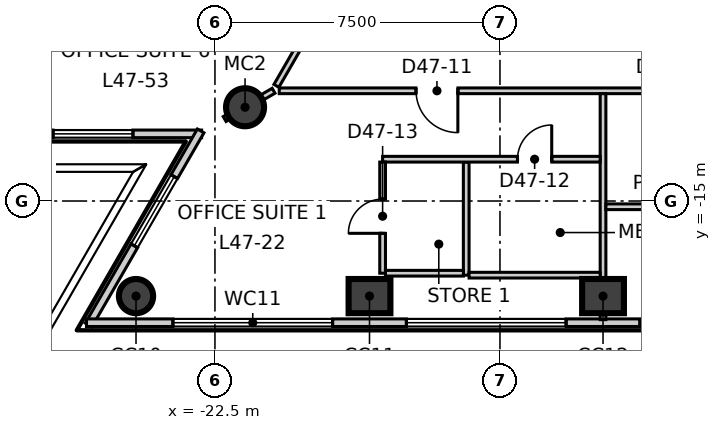
"""IFC4 building model, lengths in metres.
Left out: names, types, materials, properties, quantities, classifications, styles, units other than length and angle.
Written with IfcOpenShell. Run it as: python <this file> out.ifc"""

import sys

from ifc_helpers import new_model, si_unit, direction, frame, frame_2d, origin, origin_2d, place, context, subcontext, project, spatial, rectangle, circle, extrude, element, fill, save


model = new_model("IFC4")
c1 = context("Model", 3, precision=1e-05, world=origin(), true_north=direction((0.0, 1.0)))
c2 = subcontext(c1, "Body", "Model", "MODEL_VIEW")
j1 = project(units=[si_unit("LENGTHUNIT", "METRE"), si_unit("PLANEANGLEUNIT", "RADIAN")], contexts=[c1])
p1 = place(None, origin())
s1 = spatial("IfcSite", under=j1, at=p1, CompositionType="ELEMENT")
p2 = place(p1, origin())
s2 = spatial("IfcBuilding", under=s1, at=p2, CompositionType="ELEMENT")
p3 = place(p2, frame((0.0, 0.0, 203.3)))
s3 = spatial("IfcBuildingStorey", under=s2, at=p3, CompositionType="ELEMENT", Elevation=203.3)
p4 = place(p3, frame((-24.577, -17.502, -0.3), z_axis=(0.0, 0.0, 1.0), x_axis=(1.0, 0.0, 0.0)))
e1 = element("IfcColumn", 1, at=p4, inside=s3, PredefinedType="COLUMN", context=c2, shape_type="SweptSolid", body=[
    extrude(circle(Radius=0.45, at=origin_2d()), origin(), (0.0, 0.0, 1.0), 4.0),
])
for number, where, z_axis, x_axis in (
    (2, (-18.433, -17.502, -0.3), (0.0, 0.0, 1.0), (1.0, 0.0, 0.0)),
    (3, (-12.288, -17.502, -0.3), (0.0, 0.0, 1.0), (1.0, 0.0, 0.0)),
):
    element("IfcColumn", number, at=place(p3, frame(where, z_axis=z_axis, x_axis=x_axis)), inside=s3, PredefinedType="COLUMN", context=c2, shape_type="SweptSolid", body=[
        extrude(rectangle(XDim=1.1, YDim=0.9, at=origin_2d()), origin(), (0.0, 0.0, 1.0), 4.0),
    ])
p5 = place(p3, frame((-21.708, -12.533, -0.3), z_axis=(0.0, 0.0, 1.0), x_axis=(1.0, 0.0, 0.0)))
e4 = element("IfcColumn", 4, at=p5, inside=s3, PredefinedType="COLUMN", context=c2, shape_type="SweptSolid", body=[
    extrude(circle(Radius=0.5, at=origin_2d()), origin(), (0.0, 0.0, 1.0), 4.0),
])
p6 = place(p3, frame((-2.824, 31.513, 0.0), z_axis=(0.0, 0.0, 1.0), x_axis=(-0.500012324412, -0.866018288165, 0.0)))
e5 = element("IfcWall", 5, at=p6, inside=s3, PredefinedType="ELEMENTEDWALL", context=c2, shape_type="SweptSolid", body=[
    extrude(rectangle(XDim=51.739, YDim=0.2, at=frame_2d((25.87, 0.0))), origin(), (0.0, 0.0, 1.0), 3.7),
])
p7 = place(p6, frame((2.275, 0.0, 0.9)))
e6 = element("IfcOpeningElement", 6, at=p7, cuts=e5, PredefinedType="OPENING", context=c2, shape_type="SweptSolid", body=[
    extrude(rectangle(XDim=4.2, YDim=2.5, at=frame_2d((2.1, 1.25))), frame((0.0, 0.11, 0.0), z_axis=(0.0, -1.0, 0.0), x_axis=(1.0, 0.0, 0.0)), (0.0, 0.0, 1.0), 0.22),
])
p8 = place(p6, frame((8.419, 0.0, 0.9)))
e7 = element("IfcOpeningElement", 7, at=p8, cuts=e5, PredefinedType="OPENING", context=c2, shape_type="SweptSolid", body=[
    extrude(rectangle(XDim=4.2, YDim=2.5, at=frame_2d((2.1, 1.25))), frame((0.0, 0.11, 0.0), z_axis=(0.0, -1.0, 0.0), x_axis=(1.0, 0.0, 0.0)), (0.0, 0.0, 1.0), 0.22),
])
p9 = place(p6, frame((14.563, 0.0, 0.9)))
e8 = element("IfcOpeningElement", 8, at=p9, cuts=e5, PredefinedType="OPENING", context=c2, shape_type="SweptSolid", body=[
    extrude(rectangle(XDim=4.2, YDim=2.5, at=frame_2d((2.1, 1.25))), frame((0.0, 0.11, 0.0), z_axis=(0.0, -1.0, 0.0), x_axis=(1.0, 0.0, 0.0)), (0.0, 0.0, 1.0), 0.22),
])
p10 = place(p6, frame((20.707, 0.0, 0.9)))
e9 = element("IfcOpeningElement", 9, at=p10, cuts=e5, PredefinedType="OPENING", context=c2, shape_type="SweptSolid", body=[
    extrude(rectangle(XDim=4.2, YDim=2.5, at=frame_2d((2.1, 1.25))), frame((0.0, 0.11, 0.0), z_axis=(0.0, -1.0, 0.0), x_axis=(1.0, 0.0, 0.0)), (0.0, 0.0, 1.0), 0.22),
])
p11 = place(p6, frame((26.851, 0.0, 0.9)))
e10 = element("IfcOpeningElement", 10, at=p11, cuts=e5, PredefinedType="OPENING", context=c2, shape_type="SweptSolid", body=[
    extrude(rectangle(XDim=4.2, YDim=2.5, at=frame_2d((2.1, 1.25))), frame((0.0, 0.11, 0.0), z_axis=(0.0, -1.0, 0.0), x_axis=(1.0, 0.0, 0.0)), (0.0, 0.0, 1.0), 0.22),
])
p12 = place(p6, frame((32.995, 0.0, 0.9)))
e11 = element("IfcOpeningElement", 11, at=p12, cuts=e5, PredefinedType="OPENING", context=c2, shape_type="SweptSolid", body=[
    extrude(rectangle(XDim=4.2, YDim=2.5, at=frame_2d((2.1, 1.25))), frame((0.0, 0.11, 0.0), z_axis=(0.0, -1.0, 0.0), x_axis=(1.0, 0.0, 0.0)), (0.0, 0.0, 1.0), 0.22),
])
p13 = place(p6, frame((39.14, 0.0, 0.9)))
e12 = element("IfcOpeningElement", 12, at=p13, cuts=e5, PredefinedType="OPENING", context=c2, shape_type="SweptSolid", body=[
    extrude(rectangle(XDim=4.2, YDim=2.5, at=frame_2d((2.1, 1.25))), frame((0.0, 0.11, 0.0), z_axis=(0.0, -1.0, 0.0), x_axis=(1.0, 0.0, 0.0)), (0.0, 0.0, 1.0), 0.22),
])
p14 = place(p6, frame((45.284, 0.0, 0.9)))
e13 = element("IfcOpeningElement", 13, at=p14, cuts=e5, PredefinedType="OPENING", context=c2, shape_type="SweptSolid", body=[
    extrude(rectangle(XDim=4.2, YDim=2.5, at=frame_2d((2.1, 1.25))), frame((0.0, 0.11, 0.0), z_axis=(0.0, -1.0, 0.0), x_axis=(1.0, 0.0, 0.0)), (0.0, 0.0, 1.0), 0.22),
])
p15 = place(p3, frame((-28.749, -13.233, 0.0), z_axis=(0.0, 0.0, 1.0), x_axis=(1.0, 0.0, 0.0)))
e14 = element("IfcWall", 14, at=p15, inside=s3, PredefinedType="ELEMENTEDWALL", context=c2, shape_type="SweptSolid", body=[
    extrude(rectangle(XDim=5.898, YDim=0.2, at=frame_2d((2.949, 0.0))), origin(), (0.0, 0.0, 1.0), 3.7),
])
p16 = place(p15, frame((1.99, 0.0, 0.9)))
e15 = element("IfcOpeningElement", 15, at=p16, cuts=e14, PredefinedType="OPENING", context=c2, shape_type="SweptSolid", body=[
    extrude(rectangle(XDim=2.1, YDim=2.5, at=frame_2d((1.05, 1.25))), frame((0.0, 0.11, 0.0), z_axis=(0.0, -1.0, 0.0), x_axis=(1.0, 0.0, 0.0)), (0.0, 0.0, 1.0), 0.22),
])
p17 = place(p3, frame((-22.876, -13.155, 0.0), z_axis=(0.0, 0.0, 1.0), x_axis=(-0.499989993172, -0.866031181152, 0.0)))
e16 = element("IfcWall", 16, at=p17, inside=s3, PredefinedType="ELEMENTEDWALL", context=c2, shape_type="SweptSolid", body=[
    extrude(rectangle(XDim=5.898, YDim=0.2, at=frame_2d((2.949, 0.0))), origin(), (0.0, 0.0, 1.0), 3.7),
])
p18 = place(p17, frame((1.39, 0.0, 0.9)))
e17 = element("IfcOpeningElement", 17, at=p18, cuts=e16, PredefinedType="OPENING", context=c2, shape_type="SweptSolid", body=[
    extrude(rectangle(XDim=2.1, YDim=2.5, at=frame_2d((1.05, 1.25))), frame((0.0, 0.11, 0.0), z_axis=(0.0, -1.0, 0.0), x_axis=(1.0, 0.0, 0.0)), (0.0, 0.0, 1.0), 0.22),
])
p19 = place(p3, frame((-25.88, -18.202, 0.0), z_axis=(0.0, 0.0, 1.0), x_axis=(1.0, 0.0, 0.0)))
e18 = element("IfcWall", 18, at=p19, inside=s3, PredefinedType="ELEMENTEDWALL", context=c2, shape_type="SweptSolid", body=[
    extrude(rectangle(XDim=51.74, YDim=0.2, at=frame_2d((25.87, 0.0))), origin(), (0.0, 0.0, 1.0), 3.7),
])
p20 = place(p19, frame((2.275, 0.0, 0.9)))
e19 = element("IfcOpeningElement", 19, at=p20, cuts=e18, PredefinedType="OPENING", context=c2, shape_type="SweptSolid", body=[
    extrude(rectangle(XDim=4.2, YDim=2.5, at=frame_2d((2.1, 1.25))), frame((0.0, 0.11, 0.0), z_axis=(0.0, -1.0, 0.0), x_axis=(1.0, 0.0, 0.0)), (0.0, 0.0, 1.0), 0.22),
])
p21 = place(p19, frame((8.419, 0.0, 0.9)))
e20 = element("IfcOpeningElement", 20, at=p21, cuts=e18, PredefinedType="OPENING", context=c2, shape_type="SweptSolid", body=[
    extrude(rectangle(XDim=4.2, YDim=2.5, at=frame_2d((2.1, 1.25))), frame((0.0, 0.11, 0.0), z_axis=(0.0, -1.0, 0.0), x_axis=(1.0, 0.0, 0.0)), (0.0, 0.0, 1.0), 0.22),
])
p22 = place(p19, frame((14.564, 0.0, 0.9)))
e21 = element("IfcOpeningElement", 21, at=p22, cuts=e18, PredefinedType="OPENING", context=c2, shape_type="SweptSolid", body=[
    extrude(rectangle(XDim=4.2, YDim=2.5, at=frame_2d((2.1, 1.25))), frame((0.0, 0.11, 0.0), z_axis=(0.0, -1.0, 0.0), x_axis=(1.0, 0.0, 0.0)), (0.0, 0.0, 1.0), 0.22),
])
p23 = place(p19, frame((20.708, 0.0, 0.9)))
e22 = element("IfcOpeningElement", 22, at=p23, cuts=e18, PredefinedType="OPENING", context=c2, shape_type="SweptSolid", body=[
    extrude(rectangle(XDim=4.2, YDim=2.5, at=frame_2d((2.1, 1.25))), frame((0.0, 0.11, 0.0), z_axis=(0.0, -1.0, 0.0), x_axis=(1.0, 0.0, 0.0)), (0.0, 0.0, 1.0), 0.22),
])
p24 = place(p19, frame((26.852, 0.0, 0.9)))
e23 = element("IfcOpeningElement", 23, at=p24, cuts=e18, PredefinedType="OPENING", context=c2, shape_type="SweptSolid", body=[
    extrude(rectangle(XDim=4.2, YDim=2.5, at=frame_2d((2.1, 1.25))), frame((0.0, 0.11, 0.0), z_axis=(0.0, -1.0, 0.0), x_axis=(1.0, 0.0, 0.0)), (0.0, 0.0, 1.0), 0.22),
])
p25 = place(p19, frame((32.996, 0.0, 0.9)))
e24 = element("IfcOpeningElement", 24, at=p25, cuts=e18, PredefinedType="OPENING", context=c2, shape_type="SweptSolid", body=[
    extrude(rectangle(XDim=4.2, YDim=2.5, at=frame_2d((2.1, 1.25))), frame((0.0, 0.11, 0.0), z_axis=(0.0, -1.0, 0.0), x_axis=(1.0, 0.0, 0.0)), (0.0, 0.0, 1.0), 0.22),
])
p26 = place(p19, frame((39.141, 0.0, 0.9)))
e25 = element("IfcOpeningElement", 25, at=p26, cuts=e18, PredefinedType="OPENING", context=c2, shape_type="SweptSolid", body=[
    extrude(rectangle(XDim=4.2, YDim=2.5, at=frame_2d((2.1, 1.25))), frame((0.0, 0.11, 0.0), z_axis=(0.0, -1.0, 0.0), x_axis=(1.0, 0.0, 0.0)), (0.0, 0.0, 1.0), 0.22),
])
p27 = place(p19, frame((45.285, 0.0, 0.9)))
e26 = element("IfcOpeningElement", 26, at=p27, cuts=e18, PredefinedType="OPENING", context=c2, shape_type="SweptSolid", body=[
    extrude(rectangle(XDim=4.2, YDim=2.5, at=frame_2d((2.1, 1.25))), frame((0.0, 0.11, 0.0), z_axis=(0.0, -1.0, 0.0), x_axis=(1.0, 0.0, 0.0)), (0.0, 0.0, 1.0), 0.22),
])
p28 = place(p3, frame((-22.245, -12.843, 0.0), z_axis=(0.0, 0.0, 1.0), x_axis=(0.865961433946, 0.500110782645, 0.0)))
e27 = element("IfcWall", 27, at=p28, inside=s3, PredefinedType="PARTITIONING", context=c2, shape_type="SweptSolid", body=[
    extrude(rectangle(XDim=1.488, YDim=0.15, at=frame_2d((0.744, 0.0))), origin(), (0.0, 0.0, 1.0), 3.2),
])
p29 = place(p3, frame((-20.883, -11.97, 0.0), z_axis=(0.0, 0.0, 1.0), x_axis=(0.500006150555, 0.866021852731, 0.0)))
e28 = element("IfcWall", 28, at=p29, inside=s3, PredefinedType="PARTITIONING", context=c2, shape_type="SweptSolid", body=[
    extrude(rectangle(XDim=41.766, YDim=0.15, at=frame_2d((20.883, 0.0))), origin(), (0.0, 0.0, 1.0), 3.7),
])
p30 = place(p29, frame((36.916, 0.0, 0.0)))
e29 = element("IfcOpeningElement", 29, at=p30, cuts=e28, PredefinedType="OPENING", context=c2, shape_type="SweptSolid", body=[
    extrude(rectangle(XDim=1.1, YDim=2.1, at=frame_2d((0.55, 1.05))), frame((0.0, 0.085, 0.0), z_axis=(0.0, -1.0, 0.0), x_axis=(1.0, 0.0, 0.0)), (0.0, 0.0, 1.0), 0.17),
])
p31 = place(p29, frame((26.446, 0.0, 0.0)))
e30 = element("IfcOpeningElement", 30, at=p31, cuts=e28, PredefinedType="OPENING", context=c2, shape_type="SweptSolid", body=[
    extrude(rectangle(XDim=1.1, YDim=2.1, at=frame_2d((0.55, 1.05))), frame((0.0, 0.085, 0.0), z_axis=(0.0, -1.0, 0.0), x_axis=(1.0, 0.0, 0.0)), (0.0, 0.0, 1.0), 0.17),
])
p32 = place(p29, frame((9.757, 0.0, 0.0)))
e31 = element("IfcOpeningElement", 31, at=p32, cuts=e28, PredefinedType="OPENING", context=c2, shape_type="SweptSolid", body=[
    extrude(rectangle(XDim=1.1, YDim=2.1, at=frame_2d((0.55, 1.05))), frame((0.0, 0.085, 0.0), z_axis=(0.0, -1.0, 0.0), x_axis=(1.0, 0.0, 0.0)), (0.0, 0.0, 1.0), 0.17),
])
p33 = place(p29, frame((18.757, 0.0, 0.0)))
e32 = element("IfcOpeningElement", 32, at=p33, cuts=e28, PredefinedType="OPENING", context=c2, shape_type="SweptSolid", body=[
    extrude(rectangle(XDim=0.9, YDim=2.1, at=frame_2d((0.45, 1.05))), frame((0.0, 0.085, 0.0), z_axis=(0.0, -1.0, 0.0), x_axis=(1.0, 0.0, 0.0)), (0.0, 0.0, 1.0), 0.17),
])
p34 = place(p29, frame((15.557, 0.0, 0.0)))
e33 = element("IfcOpeningElement", 33, at=p34, cuts=e28, PredefinedType="OPENING", context=c2, shape_type="SweptSolid", body=[
    extrude(rectangle(XDim=0.9, YDim=2.1, at=frame_2d((0.45, 1.05))), frame((0.0, 0.085, 0.0), z_axis=(0.0, -1.0, 0.0), x_axis=(1.0, 0.0, 0.0)), (0.0, 0.0, 1.0), 0.17),
])
p35 = place(p29, frame((12.657, 0.0, 0.0)))
e34 = element("IfcOpeningElement", 34, at=p35, cuts=e28, PredefinedType="OPENING", context=c2, shape_type="SweptSolid", body=[
    extrude(rectangle(XDim=1.0, YDim=2.1, at=frame_2d((0.5, 1.05))), frame((0.0, 0.085, 0.0), z_axis=(0.0, -1.0, 0.0), x_axis=(1.0, 0.0, 0.0)), (0.0, 0.0, 1.0), 0.17),
])
p36 = place(p29, frame((3.669, 0.0, 0.0)))
e35 = element("IfcOpeningElement", 35, at=p36, cuts=e28, PredefinedType="OPENING", context=c2, shape_type="SweptSolid", body=[
    extrude(rectangle(XDim=1.1, YDim=2.1, at=frame_2d((0.55, 1.05))), frame((0.0, 0.085, 0.0), z_axis=(0.0, -1.0, 0.0), x_axis=(1.0, 0.0, 0.0)), (0.0, 0.0, 1.0), 0.17),
])
p37 = place(p3, frame((-20.808, -12.1, 0.0), z_axis=(0.0, 0.0, 1.0), x_axis=(1.0, 0.0, 0.0)))
e36 = element("IfcWall", 36, at=p37, inside=s3, PredefinedType="PARTITIONING", context=c2, shape_type="SweptSolid", body=[
    extrude(rectangle(XDim=41.766, YDim=0.15, at=frame_2d((20.883, 0.0))), origin(), (0.0, 0.0, 1.0), 3.7),
])
p38 = place(p37, frame((3.6, 0.0, 0.0)))
e37 = element("IfcOpeningElement", 37, at=p38, cuts=e36, PredefinedType="OPENING", context=c2, shape_type="SweptSolid", body=[
    extrude(rectangle(XDim=1.1, YDim=2.1, at=frame_2d((0.55, 1.05))), frame((0.0, 0.085, 0.0), z_axis=(0.0, -1.0, 0.0), x_axis=(1.0, 0.0, 0.0)), (0.0, 0.0, 1.0), 0.17),
])
p39 = place(p37, frame((17.07, 0.0, 0.0)))
e38 = element("IfcOpeningElement", 38, at=p39, cuts=e36, PredefinedType="OPENING", context=c2, shape_type="SweptSolid", body=[
    extrude(rectangle(XDim=1.1, YDim=2.1, at=frame_2d((0.55, 1.05))), frame((0.0, 0.085, 0.0), z_axis=(0.0, -1.0, 0.0), x_axis=(1.0, 0.0, 0.0)), (0.0, 0.0, 1.0), 0.17),
])
p40 = place(p37, frame((9.87, 0.0, 0.0)))
e39 = element("IfcOpeningElement", 39, at=p40, cuts=e36, PredefinedType="OPENING", context=c2, shape_type="SweptSolid", body=[
    extrude(rectangle(XDim=0.9, YDim=2.1, at=frame_2d((0.45, 1.05))), frame((0.0, 0.085, 0.0), z_axis=(0.0, -1.0, 0.0), x_axis=(1.0, 0.0, 0.0)), (0.0, 0.0, 1.0), 0.17),
])
p41 = place(p37, frame((12.87, 0.0, 0.0)))
e40 = element("IfcOpeningElement", 40, at=p41, cuts=e36, PredefinedType="OPENING", context=c2, shape_type="SweptSolid", body=[
    extrude(rectangle(XDim=0.9, YDim=2.1, at=frame_2d((0.45, 1.05))), frame((0.0, 0.085, 0.0), z_axis=(0.0, -1.0, 0.0), x_axis=(1.0, 0.0, 0.0)), (0.0, 0.0, 1.0), 0.17),
])
p42 = place(p37, frame((27.658, 0.0, 0.0)))
e41 = element("IfcOpeningElement", 41, at=p42, cuts=e36, PredefinedType="OPENING", context=c2, shape_type="SweptSolid", body=[
    extrude(rectangle(XDim=1.0, YDim=2.1, at=frame_2d((0.5, 1.05))), frame((0.0, 0.085, 0.0), z_axis=(0.0, -1.0, 0.0), x_axis=(1.0, 0.0, 0.0)), (0.0, 0.0, 1.0), 0.17),
])
p43 = place(p37, frame((21.558, 0.0, 0.0)))
e42 = element("IfcOpeningElement", 42, at=p43, cuts=e36, PredefinedType="OPENING", context=c2, shape_type="SweptSolid", body=[
    extrude(rectangle(XDim=0.9, YDim=2.1, at=frame_2d((0.45, 1.05))), frame((0.0, 0.085, 0.0), z_axis=(0.0, -1.0, 0.0), x_axis=(1.0, 0.0, 0.0)), (0.0, 0.0, 1.0), 0.17),
])
p44 = place(p37, frame((36.847, 0.0, 0.0)))
e43 = element("IfcOpeningElement", 43, at=p44, cuts=e36, PredefinedType="OPENING", context=c2, shape_type="SweptSolid", body=[
    extrude(rectangle(XDim=1.1, YDim=2.1, at=frame_2d((0.55, 1.05))), frame((0.0, 0.085, 0.0), z_axis=(0.0, -1.0, 0.0), x_axis=(1.0, 0.0, 0.0)), (0.0, 0.0, 1.0), 0.17),
])
p45 = place(p3, frame((-12.288, -18.122, 0.0), z_axis=(0.0, 0.0, 1.0), x_axis=(0.0, 1.0, 0.0)))
e44 = element("IfcWall", 44, at=p45, inside=s3, PredefinedType="PARTITIONING", context=c2, shape_type="SweptSolid", body=[
    extrude(rectangle(XDim=5.947, YDim=0.15, at=frame_2d((2.974, 0.0))), origin(), (0.0, 0.0, 1.0), 3.7),
])
p46 = place(p3, frame((-12.213, -15.151, 0.0), z_axis=(0.0, 0.0, 1.0), x_axis=(1.0, 0.0, 0.0)))
e45 = element("IfcWall", 45, at=p46, inside=s3, PredefinedType="PARTITIONING", context=c2, shape_type="SweptSolid", body=[
    extrude(rectangle(XDim=3.525, YDim=0.15, at=frame_2d((1.762, 0.0))), origin(), (0.0, 0.0, 1.0), 3.7),
])
p47 = place(p3, frame((-15.888, -16.951, 0.0), z_axis=(0.0, 0.0, 1.0), x_axis=(0.0, 1.0, 0.0)))
e46 = element("IfcWall", 46, at=p47, inside=s3, PredefinedType="PARTITIONING", context=c2, shape_type="SweptSolid", body=[
    extrude(rectangle(XDim=2.976, YDim=0.15, at=frame_2d((1.488, 0.0))), origin(), (0.0, 0.0, 1.0), 3.7),
])
p48 = place(p3, frame((-18.088, -13.9, 0.0), z_axis=(0.0, 0.0, 1.0), x_axis=(1.0, 0.0, 0.0)))
e47 = element("IfcWall", 47, at=p48, inside=s3, PredefinedType="PARTITIONING", context=c2, shape_type="SweptSolid", body=[
    extrude(rectangle(XDim=5.725, YDim=0.15, at=frame_2d((2.862, 0.0))), origin(), (0.0, 0.0, 1.0), 3.7),
])
p49 = place(p48, frame((3.55, 0.0, 0.0)))
e48 = element("IfcOpeningElement", 48, at=p49, cuts=e47, PredefinedType="OPENING", context=c2, shape_type="SweptSolid", body=[
    extrude(rectangle(XDim=0.9, YDim=2.1, at=frame_2d((0.45, 1.05))), frame((0.0, 0.085, 0.0), z_axis=(0.0, -1.0, 0.0), x_axis=(1.0, 0.0, 0.0)), (0.0, 0.0, 1.0), 0.17),
])
p50 = place(p3, frame((-18.088, -16.9, 0.0), z_axis=(0.0, 0.0, 1.0), x_axis=(0.0, 1.0, 0.0)))
e49 = element("IfcWall", 49, at=p50, inside=s3, PredefinedType="PARTITIONING", context=c2, shape_type="SweptSolid", body=[
    extrude(rectangle(XDim=2.925, YDim=0.15, at=frame_2d((1.462, 0.0))), origin(), (0.0, 0.0, 1.0), 3.7),
])
p51 = place(p50, frame((1.05, 0.0, 0.0)))
e50 = element("IfcOpeningElement", 50, at=p51, cuts=e49, PredefinedType="OPENING", context=c2, shape_type="SweptSolid", body=[
    extrude(rectangle(XDim=0.9, YDim=2.1, at=frame_2d((0.45, 1.05))), frame((0.0, 0.085, 0.0), z_axis=(0.0, -1.0, 0.0), x_axis=(1.0, 0.0, 0.0)), (0.0, 0.0, 1.0), 0.17),
])
p52 = place(p3, frame((-18.013, -16.9, 0.0), z_axis=(0.0, 0.0, 1.0), x_axis=(1.0, 0.0, 0.0)))
e51 = element("IfcWall", 51, at=p52, inside=s3, PredefinedType="PARTITIONING", context=c2, shape_type="SweptSolid", body=[
    extrude(rectangle(XDim=2.05, YDim=0.15, at=frame_2d((1.025, 0.0))), origin(), (0.0, 0.0, 1.0), 3.7),
])
p53 = place(p3, frame((-15.813, -16.951, 0.0), z_axis=(0.0, 0.0, 1.0), x_axis=(1.0, 0.0, 0.0)))
e52 = element("IfcWall", 52, at=p53, inside=s3, PredefinedType="PARTITIONING", context=c2, shape_type="SweptSolid", body=[
    extrude(rectangle(XDim=3.45, YDim=0.15, at=frame_2d((1.725, 0.0))), origin(), (0.0, 0.0, 1.0), 3.7),
])
p54 = place(p14, origin())
e53 = element("IfcWindow", 53, at=p54, inside=s3, PartitioningType="SINGLE_PANEL", PredefinedType="WINDOW", context=c2, shape_type="SweptSolid", body=[
    extrude(rectangle(XDim=4.2, YDim=2.5, at=frame_2d((2.1, 1.25))), frame((0.0, 0.03, 0.0), z_axis=(0.0, -1.0, 0.0), x_axis=(1.0, 0.0, 0.0)), (0.0, 0.0, 1.0), 0.06),
])
fill(e13, e53)
p55 = place(p16, origin())
e54 = element("IfcWindow", 54, at=p55, inside=s3, PartitioningType="SINGLE_PANEL", PredefinedType="WINDOW", context=c2, shape_type="SweptSolid", body=[
    extrude(rectangle(XDim=2.1, YDim=2.5, at=frame_2d((1.05, 1.25))), frame((0.0, 0.03, 0.0), z_axis=(0.0, -1.0, 0.0), x_axis=(1.0, 0.0, 0.0)), (0.0, 0.0, 1.0), 0.06),
])
fill(e15, e54)
p56 = place(p18, origin())
e55 = element("IfcWindow", 55, at=p56, inside=s3, PartitioningType="SINGLE_PANEL", PredefinedType="WINDOW", context=c2, shape_type="SweptSolid", body=[
    extrude(rectangle(XDim=2.1, YDim=2.5, at=frame_2d((1.05, 1.25))), frame((0.0, 0.03, 0.0), z_axis=(0.0, -1.0, 0.0), x_axis=(1.0, 0.0, 0.0)), (0.0, 0.0, 1.0), 0.06),
])
fill(e17, e55)
p57 = place(p20, origin())
e56 = element("IfcWindow", 56, at=p57, inside=s3, PartitioningType="SINGLE_PANEL", PredefinedType="WINDOW", context=c2, shape_type="SweptSolid", body=[
    extrude(rectangle(XDim=4.2, YDim=2.5, at=frame_2d((2.1, 1.25))), frame((0.0, 0.03, 0.0), z_axis=(0.0, -1.0, 0.0), x_axis=(1.0, 0.0, 0.0)), (0.0, 0.0, 1.0), 0.06),
])
fill(e19, e56)
p58 = place(p21, origin())
e57 = element("IfcWindow", 57, at=p58, inside=s3, PartitioningType="SINGLE_PANEL", PredefinedType="WINDOW", context=c2, shape_type="SweptSolid", body=[
    extrude(rectangle(XDim=4.2, YDim=2.5, at=frame_2d((2.1, 1.25))), frame((0.0, 0.03, 0.0), z_axis=(0.0, -1.0, 0.0), x_axis=(1.0, 0.0, 0.0)), (0.0, 0.0, 1.0), 0.06),
])
fill(e20, e57)
p59 = place(p22, origin())
e58 = element("IfcWindow", 58, at=p59, inside=s3, PartitioningType="SINGLE_PANEL", PredefinedType="WINDOW", context=c2, shape_type="SweptSolid", body=[
    extrude(rectangle(XDim=4.2, YDim=2.5, at=frame_2d((2.1, 1.25))), frame((0.0, 0.03, 0.0), z_axis=(0.0, -1.0, 0.0), x_axis=(1.0, 0.0, 0.0)), (0.0, 0.0, 1.0), 0.06),
])
fill(e21, e58)
p60 = place(p38, origin())
e59 = element("IfcDoor", 59, at=p60, inside=s3, OperationType="SINGLE_SWING_RIGHT", PredefinedType="DOOR", context=c2, shape_type="SweptSolid", body=[
    extrude(rectangle(XDim=1.1, YDim=2.1, at=frame_2d((0.55, 1.05))), frame((0.0, 0.025, 0.0), z_axis=(0.0, -1.0, 0.0), x_axis=(1.0, 0.0, 0.0)), (0.0, 0.0, 1.0), 0.05),
])
fill(e37, e59)
p61 = place(p49, origin())
e60 = element("IfcDoor", 60, at=p61, inside=s3, OperationType="SINGLE_SWING_LEFT", PredefinedType="DOOR", context=c2, shape_type="SweptSolid", body=[
    extrude(rectangle(XDim=0.9, YDim=2.1, at=frame_2d((0.45, 1.05))), frame((0.0, 0.025, 0.0), z_axis=(0.0, -1.0, 0.0), x_axis=(1.0, 0.0, 0.0)), (0.0, 0.0, 1.0), 0.05),
])
fill(e48, e60)
p62 = place(p51, origin())
e61 = element("IfcDoor", 61, at=p62, inside=s3, OperationType="SINGLE_SWING_RIGHT", PredefinedType="DOOR", context=c2, shape_type="SweptSolid", body=[
    extrude(rectangle(XDim=0.9, YDim=2.1, at=frame_2d((0.45, 1.05))), frame((0.0, 0.025, 0.0), z_axis=(0.0, -1.0, 0.0), x_axis=(1.0, 0.0, 0.0)), (0.0, 0.0, 1.0), 0.05),
])
fill(e50, e61)
save(model, sys.argv[1])
